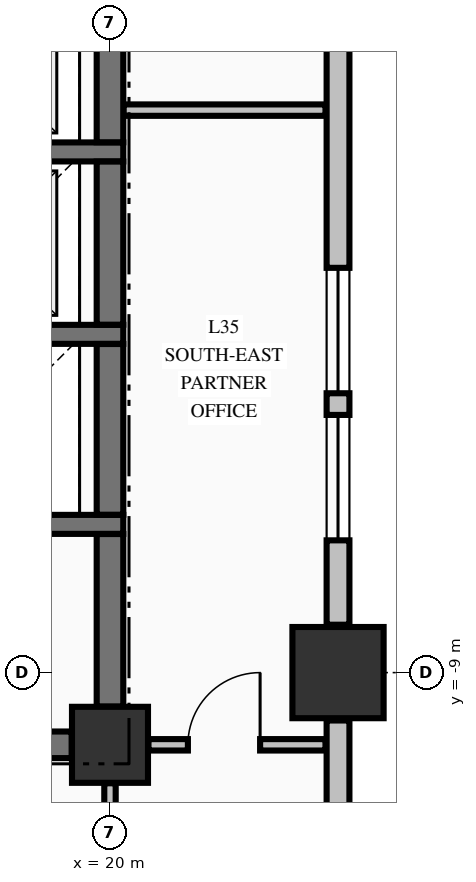
"""IFC4 building model, lengths in metres.
Left out: names, types, materials, properties, quantities, classifications, styles, units other than length and angle.
Written with IfcOpenShell. Run it as: python <this file> out.ifc"""

import sys

from ifc_helpers import new_model, si_unit, direction, frame, frame_2d, origin, origin_2d, place, context, subcontext, project, spatial, rectangle, extrude, element, fill, save


model = new_model("IFC4")
c1 = context("Model", 3, precision=1e-05, world=origin(), true_north=direction((0.0, 1.0)))
c2 = subcontext(c1, "Body", "Model", "MODEL_VIEW")
j1 = project(units=[si_unit("LENGTHUNIT", "METRE"), si_unit("PLANEANGLEUNIT", "RADIAN")], contexts=[c1])
p1 = place(None, origin())
s1 = spatial("IfcSite", under=j1, at=p1, CompositionType="ELEMENT")
p2 = place(p1, origin())
s2 = spatial("IfcBuilding", under=s1, at=p2, CompositionType="ELEMENT")
p3 = place(p2, frame((0.0, 0.0, 139.2)))
s3 = spatial("IfcBuildingStorey", under=s2, at=p3, CompositionType="ELEMENT", Elevation=139.2)
p4 = place(p3, frame((23.0, -9.0, -0.25), z_axis=(0.0, 0.0, 1.0), x_axis=(1.0, 0.0, 0.0)))
e1 = element("IfcColumn", 1, at=p4, inside=s3, PredefinedType="COLUMN", context=c2, shape_type="SweptSolid", body=[
    extrude(rectangle(XDim=1.2, YDim=1.2, at=origin_2d()), origin(), (0.0, 0.0, 1.0), 3.495),
])
p5 = place(p3, frame((20.0, -9.95, -0.25), z_axis=(0.0, 0.0, 1.0), x_axis=(1.0, 0.0, 0.0)))
e2 = element("IfcColumn", 2, at=p5, inside=s3, PredefinedType="COLUMN", context=c2, shape_type="SweptSolid", body=[
    extrude(rectangle(XDim=1.0, YDim=1.0, at=origin_2d()), origin(), (0.0, 0.0, 1.0), 3.495),
])
p6 = place(p3, frame((23.0, -20.37, 0.0), z_axis=(0.0, 0.0, 1.0), x_axis=(0.0, 1.0, 0.0)))
e3 = element("IfcWall", 3, at=p6, inside=s3, PredefinedType="STANDARD", context=c2, shape_type="SweptSolid", body=[
    extrude(rectangle(XDim=10.74, YDim=0.3, at=frame_2d((5.37, 0.0))), origin(), (0.0, 0.0, 1.0), 2.637),
])
p7 = place(p3, frame((23.0, -8.37, 0.0), z_axis=(0.0, 0.0, 1.0), x_axis=(0.0, 1.0, 0.0)))
e4 = element("IfcWall", 4, at=p7, inside=s3, PredefinedType="STANDARD", context=c2, shape_type="SweptSolid", body=[
    extrude(rectangle(XDim=7.74, YDim=0.3, at=frame_2d((3.87, 0.0))), origin(), (0.0, 0.0, 1.0), 2.637),
])
p8 = place(p7, frame((1.11, 0.0, 0.8)))
e5 = element("IfcOpeningElement", 5, at=p8, cuts=e4, PredefinedType="OPENING", context=c2, shape_type="SweptSolid", body=[
    extrude(rectangle(XDim=1.65, YDim=1.7, at=frame_2d((0.825, 0.85))), frame((0.0, 0.16, 0.0), z_axis=(0.0, -1.0, 0.0), x_axis=(1.0, 0.0, 0.0)), (0.0, 0.0, 1.0), 0.32),
])
p9 = place(p7, frame((3.045, 0.0, 0.8)))
e6 = element("IfcOpeningElement", 6, at=p9, cuts=e4, PredefinedType="OPENING", context=c2, shape_type="SweptSolid", body=[
    extrude(rectangle(XDim=1.65, YDim=1.7, at=frame_2d((0.825, 0.85))), frame((0.0, 0.16, 0.0), z_axis=(0.0, -1.0, 0.0), x_axis=(1.0, 0.0, 0.0)), (0.0, 0.0, 1.0), 0.32),
])
p10 = place(p3, frame((14.7, -9.95, 0.0), z_axis=(0.0, 0.0, 1.0), x_axis=(1.0, 0.0, 0.0)))
e7 = element("IfcWall", 7, at=p10, inside=s3, PredefinedType="SHEAR", context=c2, shape_type="SweptSolid", body=[
    extrude(rectangle(XDim=4.796, YDim=0.35, at=frame_2d((2.398, 0.0))), origin(), (0.0, 0.0, 1.0), 3.245),
])
p11 = place(p10, frame((0.65, 0.0, 0.0)))
e8 = element("IfcOpeningElement", 8, at=p11, cuts=e7, PredefinedType="OPENING", context=c2, shape_type="SweptSolid", body=[
    extrude(rectangle(XDim=1.2, YDim=2.15, at=frame_2d((0.6, 1.075))), frame((0.0, 0.185, 0.0), z_axis=(0.0, -1.0, 0.0), x_axis=(1.0, 0.0, 0.0)), (0.0, 0.0, 1.0), 0.37),
])
for number, where, z_axis, x_axis in (
    (9, (17.025, -7.05, 0.0), (0.0, 0.0, 1.0), (1.0, 0.0, 0.0)),
    (10, (17.025, -4.55, 0.0), (0.0, 0.0, 1.0), (1.0, 0.0, 0.0)),
    (11, (17.025, -2.15, 0.0), (0.0, 0.0, 1.0), (1.0, 0.0, 0.0)),
):
    element("IfcWall", number, at=place(p3, frame(where, z_axis=z_axis, x_axis=x_axis)), inside=s3, PredefinedType="SOLIDWALL", context=c2, shape_type="SweptSolid", body=[
        extrude(rectangle(XDim=3.15, YDim=0.25, at=frame_2d((1.575, 0.0))), origin(), (0.0, 0.0, 1.0), 3.245),
    ])
p12 = place(p3, frame((20.506, -9.95, 0.0), z_axis=(0.0, 0.0, 1.0), x_axis=(1.0, 0.0, 0.0)))
e12 = element("IfcWall", 12, at=p12, inside=s3, PredefinedType="PARTITIONING", context=c2, shape_type="SweptSolid", body=[
    extrude(rectangle(XDim=2.329, YDim=0.15, at=frame_2d((1.165, 0.0))), origin(), (0.0, 0.0, 1.0), 3.245),
])
p13 = place(p12, frame((0.519, 0.0, 0.0)))
e13 = element("IfcOpeningElement", 13, at=p13, cuts=e12, PredefinedType="OPENING", context=c2, shape_type="SweptSolid", body=[
    extrude(rectangle(XDim=0.95, YDim=2.15, at=frame_2d((0.475, 1.075))), frame((0.0, 0.085, 0.0), z_axis=(0.0, -1.0, 0.0), x_axis=(1.0, 0.0, 0.0)), (0.0, 0.0, 1.0), 0.17),
])
p14 = place(p3, frame((20.178, -1.6, 0.0), z_axis=(0.0, 0.0, 1.0), x_axis=(1.0, 0.0, 0.0)))
e14 = element("IfcWall", 14, at=p14, inside=s3, PredefinedType="PARTITIONING", context=c2, shape_type="SweptSolid", body=[
    extrude(rectangle(XDim=2.657, YDim=0.15, at=frame_2d((1.329, 0.0))), origin(), (0.0, 0.0, 1.0), 3.245),
])
p15 = place(p3, frame((20.0, -9.446, 0.0), z_axis=(0.0, 0.0, 1.0), x_axis=(0.0, 1.0, 0.0)))
e15 = element("IfcWall", 15, at=p15, inside=s3, PredefinedType="SHEAR", context=c2, shape_type="SweptSolid", body=[
    extrude(rectangle(XDim=2.269, YDim=0.35, at=frame_2d((1.135, 0.0))), origin(), (0.0, 0.0, 1.0), 3.245),
])
p16 = place(p3, frame((20.0, -6.923, 0.0), z_axis=(0.0, 0.0, 1.0), x_axis=(0.0, 1.0, 0.0)))
e16 = element("IfcWall", 16, at=p16, inside=s3, PredefinedType="SHEAR", context=c2, shape_type="SweptSolid", body=[
    extrude(rectangle(XDim=2.246, YDim=0.35, at=frame_2d((1.123, 0.0))), origin(), (0.0, 0.0, 1.0), 3.245),
])
p17 = place(p3, frame((20.0, -4.423, 0.0), z_axis=(0.0, 0.0, 1.0), x_axis=(0.0, 1.0, 0.0)))
e17 = element("IfcWall", 17, at=p17, inside=s3, PredefinedType="SHEAR", context=c2, shape_type="SweptSolid", body=[
    extrude(rectangle(XDim=2.146, YDim=0.35, at=frame_2d((1.073, 0.0))), origin(), (0.0, 0.0, 1.0), 3.245),
])
p18 = place(p3, frame((20.0, -2.023, 0.0), z_axis=(0.0, 0.0, 1.0), x_axis=(0.0, 1.0, 0.0)))
e18 = element("IfcWall", 18, at=p18, inside=s3, PredefinedType="SHEAR", context=c2, shape_type="SweptSolid", body=[
    extrude(rectangle(XDim=1.519, YDim=0.35, at=frame_2d((0.76, 0.0))), origin(), (0.0, 0.0, 1.0), 3.245),
])
p19 = place(p3, frame((20.0, -12.472, 0.0), z_axis=(0.0, 0.0, 1.0), x_axis=(0.0, 1.0, 0.0)))
e19 = element("IfcWall", 19, at=p19, inside=s3, PredefinedType="PARTITIONING", context=c2, shape_type="SweptSolid", body=[
    extrude(rectangle(XDim=2.016, YDim=0.15, at=frame_2d((1.008, 0.0))), origin(), (0.0, 0.0, 1.0), 2.735),
])
p20 = place(p19, frame((0.747, 0.0, 0.0)))
e20 = element("IfcOpeningElement", 20, at=p20, cuts=e19, PredefinedType="OPENING", context=c2, shape_type="SweptSolid", body=[
    extrude(rectangle(XDim=0.95, YDim=2.15, at=frame_2d((0.475, 1.075))), frame((0.0, 0.085, 0.0), z_axis=(0.0, -1.0, 0.0), x_axis=(1.0, 0.0, 0.0)), (0.0, 0.0, 1.0), 0.17),
])
p21 = place(p8, origin())
e21 = element("IfcWindow", 21, at=p21, inside=s3, PartitioningType="SINGLE_PANEL", PredefinedType="WINDOW", context=c2, shape_type="SweptSolid", body=[
    extrude(rectangle(XDim=1.65, YDim=1.7, at=frame_2d((0.825, 0.85))), frame((0.0, 0.03, 0.0), z_axis=(0.0, -1.0, 0.0), x_axis=(1.0, 0.0, 0.0)), (0.0, 0.0, 1.0), 0.06),
])
fill(e5, e21)
p22 = place(p9, origin())
e22 = element("IfcWindow", 22, at=p22, inside=s3, PartitioningType="SINGLE_PANEL", PredefinedType="WINDOW", context=c2, shape_type="SweptSolid", body=[
    extrude(rectangle(XDim=1.65, YDim=1.7, at=frame_2d((0.825, 0.85))), frame((0.0, 0.03, 0.0), z_axis=(0.0, -1.0, 0.0), x_axis=(1.0, 0.0, 0.0)), (0.0, 0.0, 1.0), 0.06),
])
fill(e6, e22)
p23 = place(p13, origin())
e23 = element("IfcDoor", 23, at=p23, inside=s3, OperationType="SINGLE_SWING_RIGHT", PredefinedType="DOOR", context=c2, shape_type="SweptSolid", body=[
    extrude(rectangle(XDim=0.95, YDim=2.15, at=frame_2d((0.475, 1.075))), frame((0.0, 0.025, 0.0), z_axis=(0.0, -1.0, 0.0), x_axis=(1.0, 0.0, 0.0)), (0.0, 0.0, 1.0), 0.05),
])
fill(e13, e23)
save(model, sys.argv[1])
